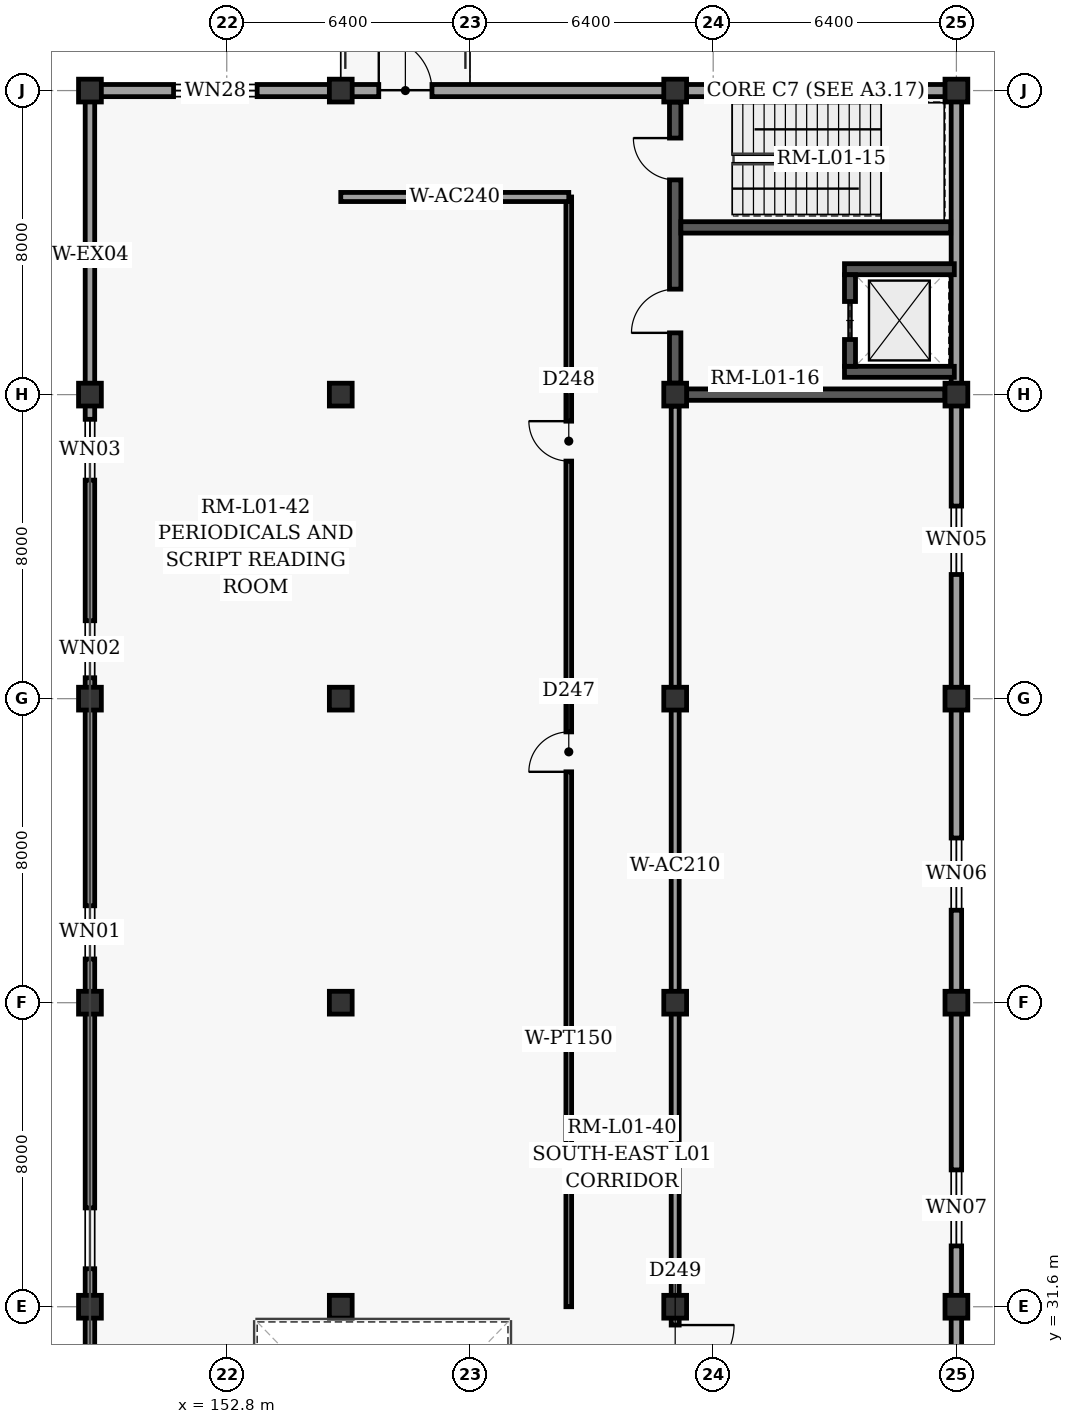
"""IFC4 building model, lengths in metres.
Left out: names, types, materials, properties, quantities, classifications, styles, units other than length and angle.
Written with IfcOpenShell. Run it as: python <this file> out.ifc"""

import sys

from ifc_helpers import new_model, si_unit, direction, frame, frame_2d, origin, origin_2d, place, context, subcontext, project, spatial, rectangle, extrude, element, fill, save


model = new_model("IFC4")
c1 = context("Model", 3, precision=1e-05, world=origin(), true_north=direction((0.0, 1.0)))
c2 = subcontext(c1, "Body", "Model", "MODEL_VIEW")
j1 = project(units=[si_unit("LENGTHUNIT", "METRE"), si_unit("PLANEANGLEUNIT", "RADIAN")], contexts=[c1])
p1 = place(None, origin())
s1 = spatial("IfcSite", under=j1, at=p1, CompositionType="ELEMENT")
p2 = place(p1, origin())
s2 = spatial("IfcBuilding", under=s1, at=p2, CompositionType="ELEMENT")
p3 = place(p2, frame((0.0, 0.0, 5.4)))
s3 = spatial("IfcBuildingStorey", under=s2, at=p3, CompositionType="ELEMENT", Elevation=5.4)
for number, where, z_axis, x_axis in (
    (1, (149.2, 31.6, 0.0), (0.0, 0.0, 1.0), (1.0, 0.0, 0.0)),
    (2, (149.2, 39.6, 0.0), (0.0, 0.0, 1.0), (1.0, 0.0, 0.0)),
    (3, (149.2, 47.6, 0.0), (0.0, 0.0, 1.0), (1.0, 0.0, 0.0)),
    (4, (149.2, 55.6, 0.0), (0.0, 0.0, 1.0), (1.0, 0.0, 0.0)),
    (5, (149.2, 63.6, 0.0), (0.0, 0.0, 1.0), (1.0, 0.0, 0.0)),
    (6, (155.8, 31.6, 0.0), (0.0, 0.0, 1.0), (1.0, 0.0, 0.0)),
    (7, (155.8, 39.6, 0.0), (0.0, 0.0, 1.0), (1.0, 0.0, 0.0)),
    (8, (155.8, 47.6, 0.0), (0.0, 0.0, 1.0), (1.0, 0.0, 0.0)),
    (9, (155.8, 55.6, 0.0), (0.0, 0.0, 1.0), (1.0, 0.0, 0.0)),
    (10, (155.8, 63.6, 0.0), (0.0, 0.0, 1.0), (1.0, 0.0, 0.0)),
    (11, (164.6, 31.6, 0.0), (0.0, 0.0, 1.0), (1.0, 0.0, 0.0)),
    (12, (164.6, 39.6, 0.0), (0.0, 0.0, 1.0), (1.0, 0.0, 0.0)),
    (13, (164.6, 47.6, 0.0), (0.0, 0.0, 1.0), (1.0, 0.0, 0.0)),
    (14, (164.6, 55.6, 0.0), (0.0, 0.0, 1.0), (1.0, 0.0, 0.0)),
    (15, (164.6, 63.6, 0.0), (0.0, 0.0, 1.0), (1.0, 0.0, 0.0)),
    (16, (172.0, 31.6, 0.0), (0.0, 0.0, 1.0), (1.0, 0.0, 0.0)),
    (17, (172.0, 39.6, 0.0), (0.0, 0.0, 1.0), (1.0, 0.0, 0.0)),
    (18, (172.0, 47.6, 0.0), (0.0, 0.0, 1.0), (1.0, 0.0, 0.0)),
    (19, (172.0, 55.6, 0.0), (0.0, 0.0, 1.0), (1.0, 0.0, 0.0)),
    (20, (172.0, 63.6, 0.0), (0.0, 0.0, 1.0), (1.0, 0.0, 0.0)),
):
    element("IfcColumn", number, at=place(p3, frame(where, z_axis=z_axis, x_axis=x_axis)), inside=s3, PredefinedType="COLUMN", context=c2, shape_type="SweptSolid", body=[
        extrude(rectangle(XDim=0.6, YDim=0.6, at=origin_2d()), origin(), (0.0, 0.0, 1.0), 4.8),
    ])
p4 = place(p3, frame((149.2, 15.6, 0.0), z_axis=(0.0, 0.0, 1.0), x_axis=(0.0, 1.0, 0.0)))
e21 = element("IfcWall", 21, at=p4, inside=s3, PredefinedType="SOLIDWALL", context=c2, shape_type="SweptSolid", body=[
    extrude(rectangle(XDim=48.0, YDim=0.25, at=frame_2d((24.0, 0.0))), origin(), (0.0, 0.0, 1.0), 3.67),
])
p5 = place(p4, frame((2.2, 0.0, 0.8)))
e22 = element("IfcOpeningElement", 22, at=p5, cuts=e21, PredefinedType="OPENING", context=c2, shape_type="SweptSolid", body=[
    extrude(rectangle(XDim=1.6, YDim=1.65, at=frame_2d((0.8, 0.825))), frame((0.0, 0.135, 0.0), z_axis=(0.0, -1.0, 0.0), x_axis=(1.0, 0.0, 0.0)), (0.0, 0.0, 1.0), 0.27),
])
p6 = place(p4, frame((9.6, 0.0, 0.8)))
e23 = element("IfcOpeningElement", 23, at=p6, cuts=e21, PredefinedType="OPENING", context=c2, shape_type="SweptSolid", body=[
    extrude(rectangle(XDim=1.6, YDim=1.65, at=frame_2d((0.8, 0.825))), frame((0.0, 0.135, 0.0), z_axis=(0.0, -1.0, 0.0), x_axis=(1.0, 0.0, 0.0)), (0.0, 0.0, 1.0), 0.27),
])
p7 = place(p4, frame((17.0, 0.0, 0.8)))
e24 = element("IfcOpeningElement", 24, at=p7, cuts=e21, PredefinedType="OPENING", context=c2, shape_type="SweptSolid", body=[
    extrude(rectangle(XDim=1.6, YDim=1.65, at=frame_2d((0.8, 0.825))), frame((0.0, 0.135, 0.0), z_axis=(0.0, -1.0, 0.0), x_axis=(1.0, 0.0, 0.0)), (0.0, 0.0, 1.0), 0.27),
])
p8 = place(p4, frame((25.15, 0.0, 0.8)))
e25 = element("IfcOpeningElement", 25, at=p8, cuts=e21, PredefinedType="OPENING", context=c2, shape_type="SweptSolid", body=[
    extrude(rectangle(XDim=1.4, YDim=2.1, at=frame_2d((0.7, 1.05))), frame((0.0, 0.135, 0.0), z_axis=(0.0, -1.0, 0.0), x_axis=(1.0, 0.0, 0.0)), (0.0, 0.0, 1.0), 0.27),
])
p9 = place(p4, frame((32.55, 0.0, 0.8)))
e26 = element("IfcOpeningElement", 26, at=p9, cuts=e21, PredefinedType="OPENING", context=c2, shape_type="SweptSolid", body=[
    extrude(rectangle(XDim=1.5, YDim=2.1, at=frame_2d((0.75, 1.05))), frame((0.0, 0.135, 0.0), z_axis=(0.0, -1.0, 0.0), x_axis=(1.0, 0.0, 0.0)), (0.0, 0.0, 1.0), 0.27),
])
p10 = place(p4, frame((37.75, 0.0, 0.8)))
e27 = element("IfcOpeningElement", 27, at=p10, cuts=e21, PredefinedType="OPENING", context=c2, shape_type="SweptSolid", body=[
    extrude(rectangle(XDim=1.6, YDim=2.1, at=frame_2d((0.8, 1.05))), frame((0.0, 0.135, 0.0), z_axis=(0.0, -1.0, 0.0), x_axis=(1.0, 0.0, 0.0)), (0.0, 0.0, 1.0), 0.27),
])
p11 = place(p3, frame((149.2, 63.6, 0.0), z_axis=(0.0, 0.0, 1.0), x_axis=(1.0, 0.0, 0.0)))
e28 = element("IfcWall", 28, at=p11, inside=s3, PredefinedType="SOLIDWALL", context=c2, shape_type="SweptSolid", body=[
    extrude(rectangle(XDim=22.8, YDim=0.32, at=frame_2d((11.4, 0.0))), origin(), (0.0, 0.0, 1.0), 3.67),
])
p12 = place(p11, frame((2.2, 0.0, 0.9)))
e29 = element("IfcOpeningElement", 29, at=p12, cuts=e28, PredefinedType="OPENING", context=c2, shape_type="SweptSolid", body=[
    extrude(rectangle(XDim=2.2, YDim=1.7, at=frame_2d((1.1, 0.85))), frame((0.0, 0.17, 0.0), z_axis=(0.0, -1.0, 0.0), x_axis=(1.0, 0.0, 0.0)), (0.0, 0.0, 1.0), 0.34),
])
p13 = place(p11, frame((7.6, 0.0, 0.0)))
e30 = element("IfcOpeningElement", 30, at=p13, cuts=e28, PredefinedType="OPENING", context=c2, shape_type="SweptSolid", body=[
    extrude(rectangle(XDim=1.4, YDim=2.25, at=frame_2d((0.7, 1.125))), frame((0.0, 0.17, 0.0), z_axis=(0.0, -1.0, 0.0), x_axis=(1.0, 0.0, 0.0)), (0.0, 0.0, 1.0), 0.34),
])
p14 = place(p3, frame((172.0, 63.6, 0.0), z_axis=(0.0, 0.0, 1.0), x_axis=(0.0, -1.0, 0.0)))
e31 = element("IfcWall", 31, at=p14, inside=s3, PredefinedType="SOLIDWALL", context=c2, shape_type="SweptSolid", body=[
    extrude(rectangle(XDim=56.0, YDim=0.275, at=frame_2d((28.0, 0.0))), origin(), (0.0, 0.0, 1.0), 3.67),
])
p15 = place(p14, frame((10.933, 0.0, 0.8)))
e32 = element("IfcOpeningElement", 32, at=p15, cuts=e31, PredefinedType="OPENING", context=c2, shape_type="SweptSolid", body=[
    extrude(rectangle(XDim=1.8, YDim=2.15, at=frame_2d((0.9, 1.075))), frame((0.0, 0.147, 0.0), z_axis=(0.0, -1.0, 0.0), x_axis=(1.0, 0.0, 0.0)), (0.0, 0.0, 1.0), 0.295),
])
p16 = place(p14, frame((19.667, 0.0, 0.8)))
e33 = element("IfcOpeningElement", 33, at=p16, cuts=e31, PredefinedType="OPENING", context=c2, shape_type="SweptSolid", body=[
    extrude(rectangle(XDim=1.9, YDim=2.2, at=frame_2d((0.95, 1.1))), frame((0.0, 0.147, 0.0), z_axis=(0.0, -1.0, 0.0), x_axis=(1.0, 0.0, 0.0)), (0.0, 0.0, 1.0), 0.295),
])
p17 = place(p14, frame((28.4, 0.0, 0.8)))
e34 = element("IfcOpeningElement", 34, at=p17, cuts=e31, PredefinedType="OPENING", context=c2, shape_type="SweptSolid", body=[
    extrude(rectangle(XDim=2.0, YDim=2.2, at=frame_2d((1.0, 1.1))), frame((0.0, 0.147, 0.0), z_axis=(0.0, -1.0, 0.0), x_axis=(1.0, 0.0, 0.0)), (0.0, 0.0, 1.0), 0.295),
])
p18 = place(p14, frame((37.133, 0.0, 0.8)))
e35 = element("IfcOpeningElement", 35, at=p18, cuts=e31, PredefinedType="OPENING", context=c2, shape_type="SweptSolid", body=[
    extrude(rectangle(XDim=2.1, YDim=2.2, at=frame_2d((1.05, 1.1))), frame((0.0, 0.147, 0.0), z_axis=(0.0, -1.0, 0.0), x_axis=(1.0, 0.0, 0.0)), (0.0, 0.0, 1.0), 0.295),
])
p19 = place(p14, frame((45.117, 0.0, 0.8)))
e36 = element("IfcOpeningElement", 36, at=p19, cuts=e31, PredefinedType="OPENING", context=c2, shape_type="SweptSolid", body=[
    extrude(rectangle(XDim=2.2, YDim=2.25, at=frame_2d((1.1, 1.125))), frame((0.0, 0.147, 0.0), z_axis=(0.0, -1.0, 0.0), x_axis=(1.0, 0.0, 0.0)), (0.0, 0.0, 1.0), 0.295),
])
p20 = place(p3, frame((164.902, 55.6, 0.0), z_axis=(0.0, 0.0, 1.0), x_axis=(1.0, 0.0, 0.0)))
e37 = element("IfcWall", 37, at=p20, inside=s3, PredefinedType="SHEAR", context=c2, shape_type="SweptSolid", body=[
    extrude(rectangle(XDim=6.796, YDim=0.3, at=frame_2d((3.398, 0.0))), origin(), (0.0, 0.0, 1.0), 4.52),
])
p21 = place(p3, frame((164.6, 55.902, 0.0), z_axis=(0.0, 0.0, 1.0), x_axis=(0.0, 1.0, 0.0)))
e38 = element("IfcWall", 38, at=p21, inside=s3, PredefinedType="SHEAR", context=c2, shape_type="SweptSolid", body=[
    extrude(rectangle(XDim=7.396, YDim=0.3, at=frame_2d((3.698, 0.0))), origin(), (0.0, 0.0, 1.0), 4.52),
])
p22 = place(p21, frame((5.348, 0.0, 0.0)))
e39 = element("IfcOpeningElement", 39, at=p22, cuts=e38, PredefinedType="OPENING", context=c2, shape_type="SweptSolid", body=[
    extrude(rectangle(XDim=1.1, YDim=2.15, at=frame_2d((0.55, 1.075))), frame((0.0, 0.16, 0.0), z_axis=(0.0, -1.0, 0.0), x_axis=(1.0, 0.0, 0.0)), (0.0, 0.0, 1.0), 0.32),
])
p23 = place(p21, frame((1.323, 0.0, 0.0)))
e40 = element("IfcOpeningElement", 40, at=p23, cuts=e38, PredefinedType="OPENING", context=c2, shape_type="SweptSolid", body=[
    extrude(rectangle(XDim=1.15, YDim=2.2, at=frame_2d((0.575, 1.1))), frame((0.0, 0.16, 0.0), z_axis=(0.0, -1.0, 0.0), x_axis=(1.0, 0.0, 0.0)), (0.0, 0.0, 1.0), 0.32),
])
p24 = place(p3, frame((164.75, 60.0, 0.0), z_axis=(0.0, 0.0, 1.0), x_axis=(1.0, 0.0, 0.0)))
e41 = element("IfcWall", 41, at=p24, inside=s3, PredefinedType="SHEAR", context=c2, shape_type="SweptSolid", body=[
    extrude(rectangle(XDim=7.1, YDim=0.3, at=frame_2d((3.55, 0.0))), origin(), (0.0, 0.0, 1.0), 4.52),
])
for number, where, z_axis, x_axis in (
    (42, (169.055, 56.2, 0.0), (0.0, 0.0, 1.0), (1.0, 0.0, 0.0)),
    (43, (169.055, 58.9, 0.0), (0.0, 0.0, 1.0), (1.0, 0.0, 0.0)),
):
    element("IfcWall", number, at=place(p3, frame(where, z_axis=z_axis, x_axis=x_axis)), inside=s3, PredefinedType="SHEAR", context=c2, shape_type="SweptSolid", body=[
        extrude(rectangle(XDim=2.89, YDim=0.29, at=frame_2d((1.445, 0.0))), origin(), (0.0, 0.0, 1.0), 4.52),
    ])
p25 = place(p3, frame((169.2, 56.345, 0.0), z_axis=(0.0, 0.0, 1.0), x_axis=(0.0, 1.0, 0.0)))
e44 = element("IfcWall", 44, at=p25, inside=s3, PredefinedType="SHEAR", context=c2, shape_type="SweptSolid", body=[
    extrude(rectangle(XDim=2.41, YDim=0.29, at=frame_2d((1.205, 0.0))), origin(), (0.0, 0.0, 1.0), 4.52),
])
p26 = place(p25, frame((0.705, 0.0, 0.0)))
e45 = element("IfcOpeningElement", 45, at=p26, cuts=e44, PredefinedType="OPENING", context=c2, shape_type="SweptSolid", body=[
    extrude(rectangle(XDim=1.0, YDim=2.15, at=frame_2d((0.5, 1.075))), frame((0.0, 0.155, 0.0), z_axis=(0.0, -1.0, 0.0), x_axis=(1.0, 0.0, 0.0)), (0.0, 0.0, 1.0), 0.31),
])
p27 = place(p3, frame((161.8, 31.6, 0.0), z_axis=(0.0, 0.0, 1.0), x_axis=(0.0, 1.0, 0.0)))
e46 = element("IfcWall", 46, at=p27, inside=s3, PredefinedType="PARTITIONING", context=c2, shape_type="SweptSolid", body=[
    extrude(rectangle(XDim=29.2, YDim=0.15, at=frame_2d((14.6, 0.0))), origin(), (0.0, 0.0, 1.0), 4.52),
])
p28 = place(p27, frame((14.075, 0.0, 0.0)))
e47 = element("IfcOpeningElement", 47, at=p28, cuts=e46, PredefinedType="OPENING", context=c2, shape_type="SweptSolid", body=[
    extrude(rectangle(XDim=1.05, YDim=2.15, at=frame_2d((0.525, 1.075))), frame((0.0, 0.085, 0.0), z_axis=(0.0, -1.0, 0.0), x_axis=(1.0, 0.0, 0.0)), (0.0, 0.0, 1.0), 0.17),
])
p29 = place(p27, frame((22.251, 0.0, 0.0)))
e48 = element("IfcOpeningElement", 48, at=p29, cuts=e46, PredefinedType="OPENING", context=c2, shape_type="SweptSolid", body=[
    extrude(rectangle(XDim=1.05, YDim=2.15, at=frame_2d((0.525, 1.075))), frame((0.0, 0.085, 0.0), z_axis=(0.0, -1.0, 0.0), x_axis=(1.0, 0.0, 0.0)), (0.0, 0.0, 1.0), 0.17),
])
p30 = place(p3, frame((161.8, 60.8, 0.0), z_axis=(0.0, 0.0, 1.0), x_axis=(-1.0, 0.0, 0.0)))
e49 = element("IfcWall", 49, at=p30, inside=s3, PredefinedType="PARTITIONING", context=c2, shape_type="SweptSolid", body=[
    extrude(rectangle(XDim=6.0, YDim=0.24, at=frame_2d((3.0, 0.0))), origin(), (0.0, 0.0, 1.0), 4.52),
])
p31 = place(p3, frame((164.6, 55.298, 0.0), z_axis=(0.0, 0.0, 1.0), x_axis=(0.0, -1.0, 0.0)))
e50 = element("IfcWall", 50, at=p31, inside=s3, PredefinedType="PARTITIONING", context=c2, shape_type="SweptSolid", body=[
    extrude(rectangle(XDim=47.396, YDim=0.21, at=frame_2d((23.698, 0.0))), origin(), (0.0, 0.0, 1.0), 3.67),
])
p32 = place(p31, frame((24.18, 0.0, 0.0)))
e51 = element("IfcOpeningElement", 51, at=p32, cuts=e50, PredefinedType="OPENING", context=c2, shape_type="SweptSolid", body=[
    extrude(rectangle(XDim=1.55, YDim=2.25, at=frame_2d((0.775, 1.125))), frame((0.0, 0.115, 0.0), z_axis=(0.0, -1.0, 0.0), x_axis=(1.0, 0.0, 0.0)), (0.0, 0.0, 1.0), 0.23),
])
p33 = place(p31, frame((36.269, 0.0, 0.0)))
e52 = element("IfcOpeningElement", 52, at=p33, cuts=e50, PredefinedType="OPENING", context=c2, shape_type="SweptSolid", body=[
    extrude(rectangle(XDim=1.4, YDim=2.25, at=frame_2d((0.7, 1.125))), frame((0.0, 0.115, 0.0), z_axis=(0.0, -1.0, 0.0), x_axis=(1.0, 0.0, 0.0)), (0.0, 0.0, 1.0), 0.23),
])
p34 = place(p7, origin())
e53 = element("IfcWindow", 53, at=p34, inside=s3, PartitioningType="SINGLE_PANEL", PredefinedType="WINDOW", context=c2, shape_type="SweptSolid", body=[
    extrude(rectangle(XDim=1.6, YDim=1.65, at=frame_2d((0.8, 0.825))), frame((0.0, 0.03, 0.0), z_axis=(0.0, -1.0, 0.0), x_axis=(1.0, 0.0, 0.0)), (0.0, 0.0, 1.0), 0.06),
])
fill(e24, e53)
p35 = place(p8, origin())
e54 = element("IfcWindow", 54, at=p35, inside=s3, PartitioningType="SINGLE_PANEL", PredefinedType="WINDOW", context=c2, shape_type="SweptSolid", body=[
    extrude(rectangle(XDim=1.4, YDim=2.1, at=frame_2d((0.7, 1.05))), frame((0.0, 0.03, 0.0), z_axis=(0.0, -1.0, 0.0), x_axis=(1.0, 0.0, 0.0)), (0.0, 0.0, 1.0), 0.06),
])
fill(e25, e54)
p36 = place(p9, origin())
e55 = element("IfcWindow", 55, at=p36, inside=s3, PartitioningType="SINGLE_PANEL", PredefinedType="WINDOW", context=c2, shape_type="SweptSolid", body=[
    extrude(rectangle(XDim=1.5, YDim=2.1, at=frame_2d((0.75, 1.05))), frame((0.0, 0.03, 0.0), z_axis=(0.0, -1.0, 0.0), x_axis=(1.0, 0.0, 0.0)), (0.0, 0.0, 1.0), 0.06),
])
fill(e26, e55)
p37 = place(p10, origin())
e56 = element("IfcWindow", 56, at=p37, inside=s3, PartitioningType="SINGLE_PANEL", PredefinedType="WINDOW", context=c2, shape_type="SweptSolid", body=[
    extrude(rectangle(XDim=1.6, YDim=2.1, at=frame_2d((0.8, 1.05))), frame((0.0, 0.03, 0.0), z_axis=(0.0, -1.0, 0.0), x_axis=(1.0, 0.0, 0.0)), (0.0, 0.0, 1.0), 0.06),
])
fill(e27, e56)
p38 = place(p12, origin())
e57 = element("IfcWindow", 57, at=p38, inside=s3, PartitioningType="SINGLE_PANEL", PredefinedType="WINDOW", context=c2, shape_type="SweptSolid", body=[
    extrude(rectangle(XDim=2.2, YDim=1.7, at=frame_2d((1.1, 0.85))), frame((0.0, 0.03, 0.0), z_axis=(0.0, -1.0, 0.0), x_axis=(1.0, 0.0, 0.0)), (0.0, 0.0, 1.0), 0.06),
])
fill(e29, e57)
p39 = place(p15, origin())
e58 = element("IfcWindow", 58, at=p39, inside=s3, PartitioningType="SINGLE_PANEL", PredefinedType="WINDOW", context=c2, shape_type="SweptSolid", body=[
    extrude(rectangle(XDim=1.8, YDim=2.15, at=frame_2d((0.9, 1.075))), frame((0.0, 0.03, 0.0), z_axis=(0.0, -1.0, 0.0), x_axis=(1.0, 0.0, 0.0)), (0.0, 0.0, 1.0), 0.06),
])
fill(e32, e58)
p40 = place(p16, origin())
e59 = element("IfcWindow", 59, at=p40, inside=s3, PartitioningType="SINGLE_PANEL", PredefinedType="WINDOW", context=c2, shape_type="SweptSolid", body=[
    extrude(rectangle(XDim=1.9, YDim=2.2, at=frame_2d((0.95, 1.1))), frame((0.0, 0.03, 0.0), z_axis=(0.0, -1.0, 0.0), x_axis=(1.0, 0.0, 0.0)), (0.0, 0.0, 1.0), 0.06),
])
fill(e33, e59)
p41 = place(p17, origin())
e60 = element("IfcWindow", 60, at=p41, inside=s3, PartitioningType="SINGLE_PANEL", PredefinedType="WINDOW", context=c2, shape_type="SweptSolid", body=[
    extrude(rectangle(XDim=2.0, YDim=2.2, at=frame_2d((1.0, 1.1))), frame((0.0, 0.03, 0.0), z_axis=(0.0, -1.0, 0.0), x_axis=(1.0, 0.0, 0.0)), (0.0, 0.0, 1.0), 0.06),
])
fill(e34, e60)
p42 = place(p22, origin())
e61 = element("IfcDoor", 61, at=p42, inside=s3, OperationType="SINGLE_SWING_RIGHT", PredefinedType="DOOR", context=c2, shape_type="SweptSolid", body=[
    extrude(rectangle(XDim=1.1, YDim=2.15, at=frame_2d((0.55, 1.075))), frame((0.0, 0.025, 0.0), z_axis=(0.0, -1.0, 0.0), x_axis=(1.0, 0.0, 0.0)), (0.0, 0.0, 1.0), 0.05),
])
fill(e39, e61)
p43 = place(p23, origin())
e62 = element("IfcDoor", 62, at=p43, inside=s3, OperationType="SINGLE_SWING_LEFT", PredefinedType="DOOR", context=c2, shape_type="SweptSolid", body=[
    extrude(rectangle(XDim=1.15, YDim=2.2, at=frame_2d((0.575, 1.1))), frame((0.0, 0.025, 0.0), z_axis=(0.0, -1.0, 0.0), x_axis=(1.0, 0.0, 0.0)), (0.0, 0.0, 1.0), 0.05),
])
fill(e40, e62)
p44 = place(p26, origin())
e63 = element("IfcDoor", 63, at=p44, inside=s3, OperationType="SLIDING_TO_LEFT", PredefinedType="DOOR", context=c2, shape_type="SweptSolid", body=[
    extrude(rectangle(XDim=1.0, YDim=2.15, at=frame_2d((0.5, 1.075))), frame((0.0, 0.025, 0.0), z_axis=(0.0, -1.0, 0.0), x_axis=(1.0, 0.0, 0.0)), (0.0, 0.0, 1.0), 0.05),
])
fill(e45, e63)
p45 = place(p13, origin())
e64 = element("IfcDoor", 64, at=p45, inside=s3, OperationType="SINGLE_SWING_LEFT", PredefinedType="DOOR", context=c2, shape_type="SweptSolid", body=[
    extrude(rectangle(XDim=1.4, YDim=2.25, at=frame_2d((0.7, 1.125))), frame((0.0, 0.025, 0.0), z_axis=(0.0, -1.0, 0.0), x_axis=(1.0, 0.0, 0.0)), (0.0, 0.0, 1.0), 0.05),
])
fill(e30, e64)
p46 = place(p28, origin())
e65 = element("IfcDoor", 65, at=p46, inside=s3, OperationType="SINGLE_SWING_LEFT", PredefinedType="DOOR", context=c2, shape_type="SweptSolid", body=[
    extrude(rectangle(XDim=1.05, YDim=2.15, at=frame_2d((0.525, 1.075))), frame((0.0, 0.025, 0.0), z_axis=(0.0, -1.0, 0.0), x_axis=(1.0, 0.0, 0.0)), (0.0, 0.0, 1.0), 0.05),
])
fill(e47, e65)
p47 = place(p29, origin())
e66 = element("IfcDoor", 66, at=p47, inside=s3, OperationType="SINGLE_SWING_RIGHT", PredefinedType="DOOR", context=c2, shape_type="SweptSolid", body=[
    extrude(rectangle(XDim=1.05, YDim=2.15, at=frame_2d((0.525, 1.075))), frame((0.0, 0.025, 0.0), z_axis=(0.0, -1.0, 0.0), x_axis=(1.0, 0.0, 0.0)), (0.0, 0.0, 1.0), 0.05),
])
fill(e48, e66)
p48 = place(p32, origin())
e67 = element("IfcDoor", 67, at=p48, inside=s3, OperationType="SINGLE_SWING_LEFT", PredefinedType="DOOR", context=c2, shape_type="SweptSolid", body=[
    extrude(rectangle(XDim=1.55, YDim=2.25, at=frame_2d((0.775, 1.125))), frame((0.0, 0.025, 0.0), z_axis=(0.0, -1.0, 0.0), x_axis=(1.0, 0.0, 0.0)), (0.0, 0.0, 1.0), 0.05),
])
fill(e51, e67)
save(model, sys.argv[1])
